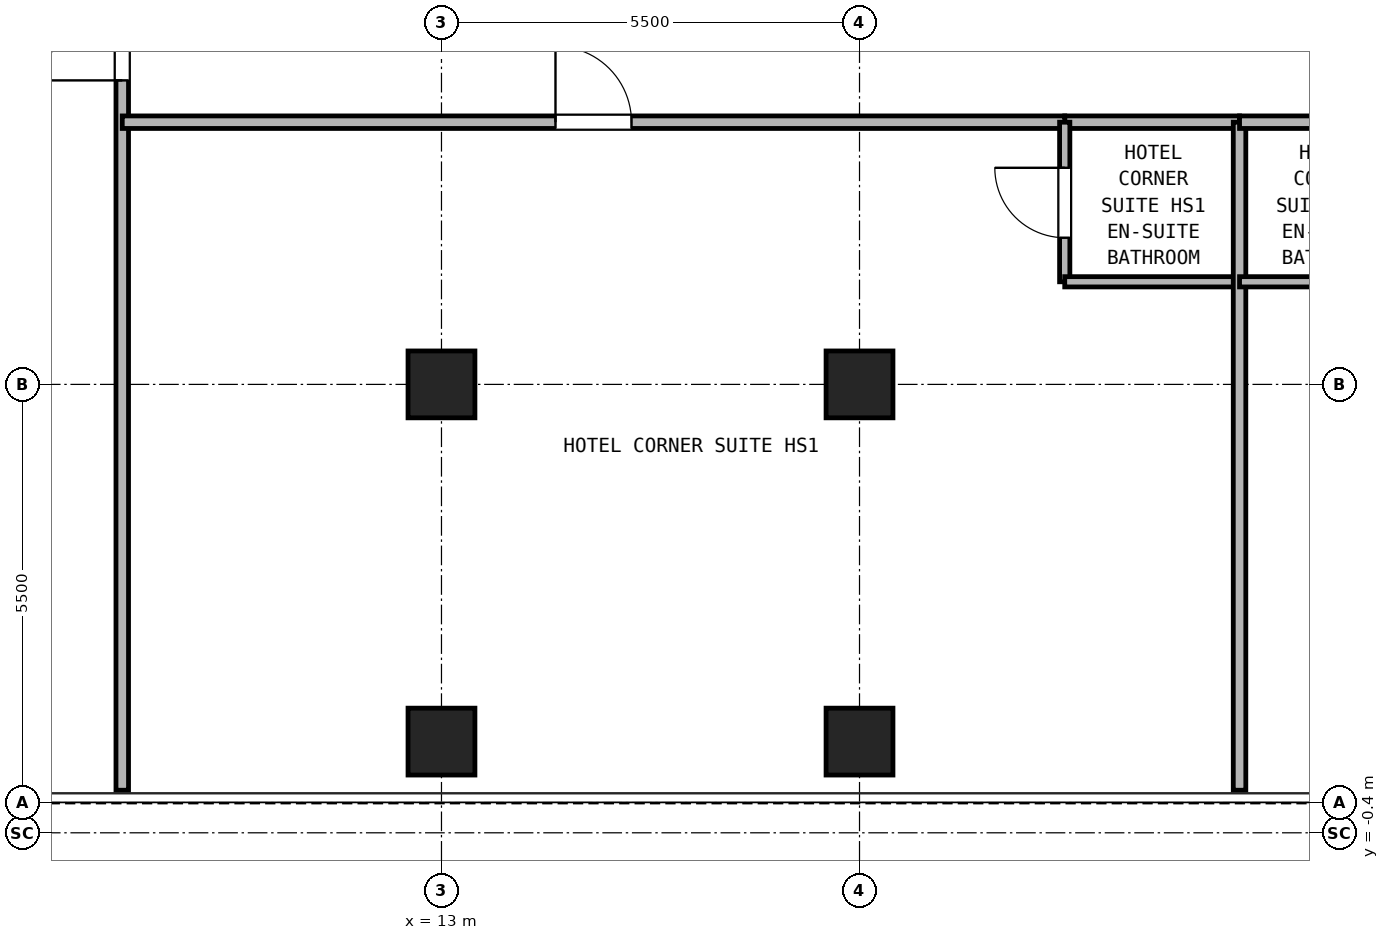
"""IFC4 building model, lengths in metres.
Left out: names, types, materials, properties, quantities, classifications, styles, units other than length and angle.
Written with IfcOpenShell. Run it as: python <this file> out.ifc"""

import sys

from ifc_helpers import new_model, si_unit, direction, frame, frame_2d, origin, origin_2d, place, context, subcontext, project, spatial, rectangle, hollow_rectangle, extrude, source, transform, mapped, element, fill, save


model = new_model("IFC4")
c1 = context("Model", 3, precision=1e-05, world=origin(), true_north=direction((0.0, 1.0)))
c2 = subcontext(c1, "Body", "Model", "MODEL_VIEW")
j1 = project(units=[si_unit("LENGTHUNIT", "METRE"), si_unit("PLANEANGLEUNIT", "RADIAN")], contexts=[c1])
p1 = place(None, origin())
s1 = spatial("IfcSite", under=j1, at=p1, CompositionType="ELEMENT")
p2 = place(p1, origin())
s2 = spatial("IfcBuilding", under=s1, at=p2, CompositionType="ELEMENT")
p3 = place(p2, frame((0.0, 0.0, 140.7)))
s3 = spatial("IfcBuildingStorey", under=s2, at=p3, CompositionType="ELEMENT", Elevation=140.7)
m1 = source(origin(), c2, "Body", "SweptSolid", [
    extrude(hollow_rectangle(XDim=0.88, YDim=0.88, WallThickness=0.05, at=origin_2d()), origin(), (0.0, 0.0, 1.0), 2.84),
])
for number, where, z_axis, x_axis in (
    (1, (13.0, 0.8, 0.0), (0.0, 0.0, 1.0), (1.0, 0.0, 0.0)),
    (2, (18.5, 0.8, 0.0), (0.0, 0.0, 1.0), (1.0, 0.0, 0.0)),
    (3, (13.0, 5.5, 0.0), (0.0, 0.0, 1.0), (1.0, 0.0, 0.0)),
    (4, (18.5, 5.5, 0.0), (0.0, 0.0, 1.0), (1.0, 0.0, 0.0)),
):
    element("IfcColumn", number, at=place(p3, frame(where, z_axis=z_axis, x_axis=x_axis)), inside=s3, PredefinedType="COLUMN", context=c2, shape_type="MappedRepresentation", body=[
        mapped(m1, transform((0.0, 0.0, 0.0), x_axis=(1.0, 0.0, 0.0), y_axis=(0.0, 1.0, 0.0), z_axis=(0.0, 0.0, 1.0), scale=1.0)),
    ])
p4 = place(p3, frame((8.8, 0.16, 0.0), z_axis=(0.0, 0.0, 1.0), x_axis=(0.0, 1.0, 0.0)))
e5 = element("IfcWall", 5, at=p4, inside=s3, PredefinedType="PARTITIONING", context=c2, shape_type="SweptSolid", body=[
    extrude(rectangle(XDim=10.89, YDim=0.165, at=frame_2d((5.445, 0.0))), origin(), (0.0, 0.0, 1.0), 2.84),
])
p5 = place(p4, frame((9.34, 0.0, 0.0)))
e6 = element("IfcOpeningElement", 6, at=p5, cuts=e5, PredefinedType="OPENING", context=c2, shape_type="SweptSolid", body=[
    extrude(rectangle(XDim=1.0, YDim=2.15, at=frame_2d((0.5, 1.075))), frame((0.0, 0.093, 0.0), z_axis=(0.0, -1.0, 0.0), x_axis=(1.0, 0.0, 0.0)), (0.0, 0.0, 1.0), 0.185),
])
p6 = place(p3, frame((21.2, 8.95, 0.0), z_axis=(0.0, 0.0, 1.0), x_axis=(1.0, 0.0, 0.0)))
e7 = element("IfcWall", 7, at=p6, inside=s3, PredefinedType="PARTITIONING", context=c2, shape_type="SweptSolid", body=[
    extrude(rectangle(XDim=2.3, YDim=0.165, at=frame_2d((1.15, 0.0))), origin(), (0.0, 0.0, 1.0), 2.84),
])
p7 = place(p3, frame((8.8, 8.95, 0.0), z_axis=(0.0, 0.0, 1.0), x_axis=(1.0, 0.0, 0.0)))
e8 = element("IfcWall", 8, at=p7, inside=s3, PredefinedType="PARTITIONING", context=c2, shape_type="SweptSolid", body=[
    extrude(rectangle(XDim=12.4, YDim=0.165, at=frame_2d((6.2, 0.0))), origin(), (0.0, 0.0, 1.0), 2.84),
])
p8 = place(p7, frame((5.7, 0.0, 0.0)))
e9 = element("IfcOpeningElement", 9, at=p8, cuts=e8, PredefinedType="OPENING", context=c2, shape_type="SweptSolid", body=[
    extrude(rectangle(XDim=1.0, YDim=2.15, at=frame_2d((0.5, 1.075))), frame((0.0, 0.093, 0.0), z_axis=(0.0, -1.0, 0.0), x_axis=(1.0, 0.0, 0.0)), (0.0, 0.0, 1.0), 0.185),
])
p9 = place(p3, frame((21.2, 6.85, 0.0), z_axis=(0.0, 0.0, 1.0), x_axis=(0.0, 1.0, 0.0)))
e10 = element("IfcWall", 10, at=p9, inside=s3, PredefinedType="PARTITIONING", context=c2, shape_type="SweptSolid", body=[
    extrude(rectangle(XDim=2.1, YDim=0.135, at=frame_2d((1.05, 0.0))), origin(), (0.0, 0.0, 1.0), 2.84),
])
p10 = place(p9, frame((0.58, 0.0, 0.0)))
e11 = element("IfcOpeningElement", 11, at=p10, cuts=e10, PredefinedType="OPENING", context=c2, shape_type="SweptSolid", body=[
    extrude(rectangle(XDim=0.92, YDim=2.1, at=frame_2d((0.46, 1.05))), frame((0.0, 0.077, 0.0), z_axis=(0.0, -1.0, 0.0), x_axis=(1.0, 0.0, 0.0)), (0.0, 0.0, 1.0), 0.155),
])
p11 = place(p3, frame((21.2, 6.85, 0.0), z_axis=(0.0, 0.0, 1.0), x_axis=(1.0, 0.0, 0.0)))
e12 = element("IfcWall", 12, at=p11, inside=s3, PredefinedType="PARTITIONING", context=c2, shape_type="SweptSolid", body=[
    extrude(rectangle(XDim=2.3, YDim=0.135, at=frame_2d((1.15, 0.0))), origin(), (0.0, 0.0, 1.0), 2.84),
])
p12 = place(p3, frame((23.5, 0.16, 0.0), z_axis=(0.0, 0.0, 1.0), x_axis=(0.0, 1.0, 0.0)))
e13 = element("IfcWall", 13, at=p12, inside=s3, PredefinedType="PARTITIONING", context=c2, shape_type="SweptSolid", body=[
    extrude(rectangle(XDim=8.79, YDim=0.165, at=frame_2d((4.395, 0.0))), origin(), (0.0, 0.0, 1.0), 2.84),
])
p13 = place(p3, frame((23.5, 8.95, 0.0), z_axis=(0.0, 0.0, 1.0), x_axis=(1.0, 0.0, 0.0)))
e14 = element("IfcWall", 14, at=p13, inside=s3, PredefinedType="PARTITIONING", context=c2, shape_type="SweptSolid", body=[
    extrude(rectangle(XDim=2.3, YDim=0.165, at=frame_2d((1.15, 0.0))), origin(), (0.0, 0.0, 1.0), 2.84),
])
p14 = place(p3, frame((23.5, 6.85, 0.0), z_axis=(0.0, 0.0, 1.0), x_axis=(1.0, 0.0, 0.0)))
e15 = element("IfcWall", 15, at=p14, inside=s3, PredefinedType="PARTITIONING", context=c2, shape_type="SweptSolid", body=[
    extrude(rectangle(XDim=2.3, YDim=0.135, at=frame_2d((1.15, 0.0))), origin(), (0.0, 0.0, 1.0), 2.84),
])
p15 = place(p5, origin())
e16 = element("IfcDoor", 16, at=p15, inside=s3, OperationType="SINGLE_SWING_LEFT", PredefinedType="DOOR", context=c2, shape_type="SweptSolid", body=[
    extrude(rectangle(XDim=1.0, YDim=2.15, at=frame_2d((0.5, 1.075))), frame((0.0, 0.025, 0.0), z_axis=(0.0, -1.0, 0.0), x_axis=(1.0, 0.0, 0.0)), (0.0, 0.0, 1.0), 0.05),
])
fill(e6, e16)
p16 = place(p10, origin())
e17 = element("IfcDoor", 17, at=p16, inside=s3, OperationType="SINGLE_SWING_RIGHT", PredefinedType="DOOR", context=c2, shape_type="SweptSolid", body=[
    extrude(rectangle(XDim=0.92, YDim=2.1, at=frame_2d((0.46, 1.05))), frame((0.0, 0.025, 0.0), z_axis=(0.0, -1.0, 0.0), x_axis=(1.0, 0.0, 0.0)), (0.0, 0.0, 1.0), 0.05),
])
fill(e11, e17)
p17 = place(p8, frame((1.0, 0.0, 0.0), z_axis=(0.0, 0.0, 1.0), x_axis=(-1.0, 0.0, 0.0)))
e18 = element("IfcDoor", 18, at=p17, inside=s3, OperationType="SINGLE_SWING_LEFT", PredefinedType="DOOR", context=c2, shape_type="SweptSolid", body=[
    extrude(rectangle(XDim=1.0, YDim=2.15, at=frame_2d((0.5, 1.075))), frame((0.0, 0.025, 0.0), z_axis=(0.0, -1.0, 0.0), x_axis=(1.0, 0.0, 0.0)), (0.0, 0.0, 1.0), 0.05),
])
fill(e9, e18)
save(model, sys.argv[1])
